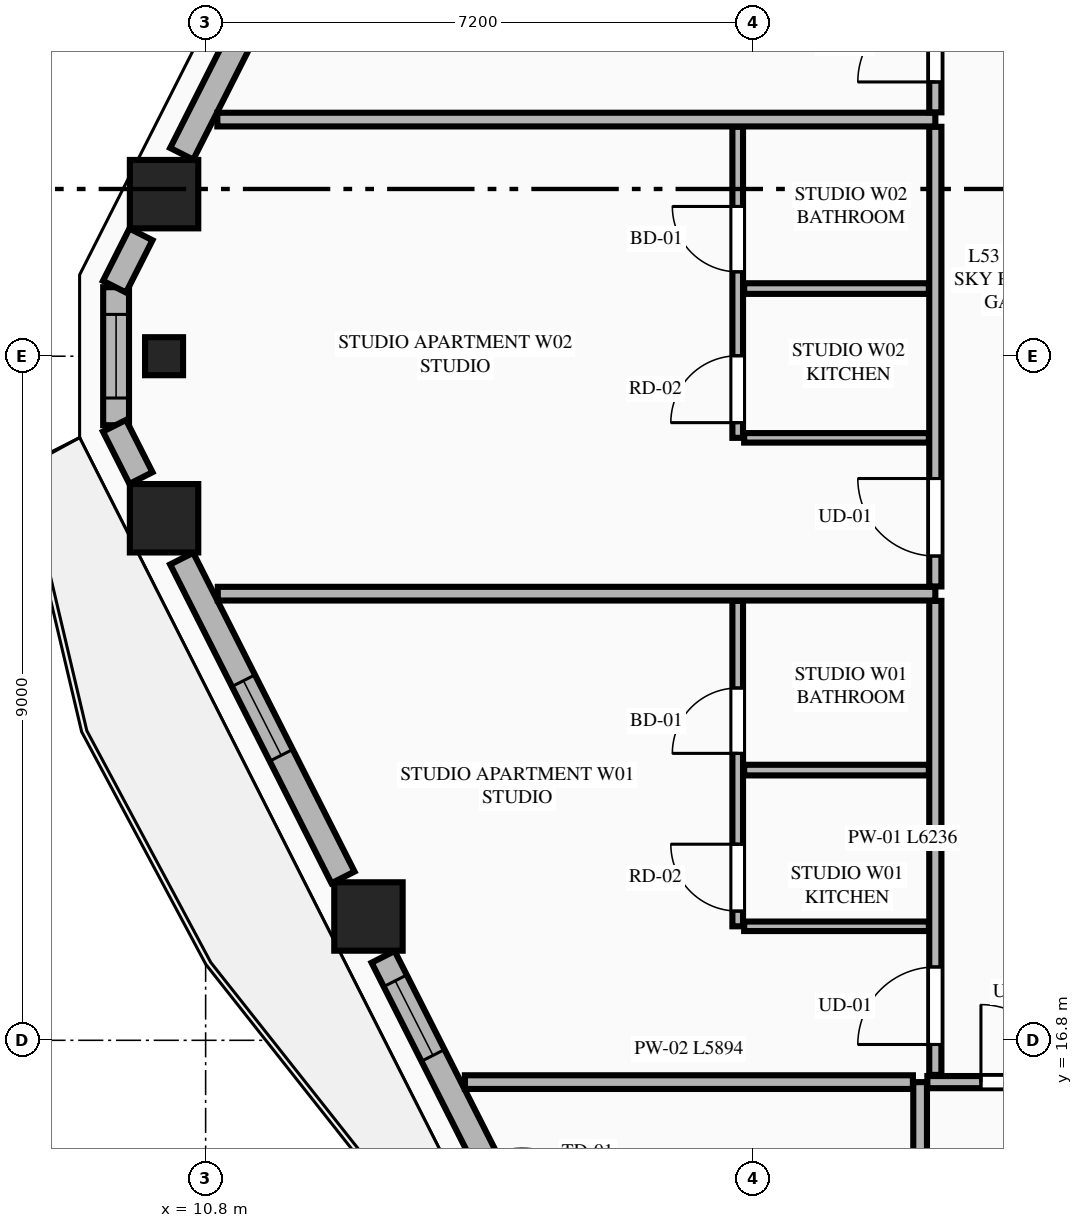
"""IFC4 building model, lengths in metres.
Left out: names, types, materials, properties, quantities, classifications, styles, units other than length and angle.
Written with IfcOpenShell. Run it as: python <this file> out.ifc"""

import sys

from ifc_helpers import new_model, si_unit, direction, frame, frame_2d, origin, origin_2d, place, context, subcontext, project, spatial, rectangle, extrude, element, fill, save


model = new_model("IFC4")
c1 = context("Model", 3, precision=1e-05, world=origin(), true_north=direction((0.0, 1.0)))
c2 = subcontext(c1, "Body", "Model", "MODEL_VIEW")
j1 = project(units=[si_unit("LENGTHUNIT", "METRE"), si_unit("PLANEANGLEUNIT", "RADIAN")], contexts=[c1])
p1 = place(None, origin())
s1 = spatial("IfcSite", under=j1, at=p1, CompositionType="ELEMENT")
p2 = place(p1, origin())
s2 = spatial("IfcBuilding", under=s1, at=p2, CompositionType="ELEMENT")
p3 = place(p2, frame((0.0, 0.0, 200.3)))
s3 = spatial("IfcBuildingStorey", under=s2, at=p3, CompositionType="ELEMENT", Elevation=200.3)
for number, where, z_axis, x_axis in (
    (1, (10.253, 27.932, 0.0), (0.0, 0.0, 1.0), (1.0, 0.0, 0.0)),
    (2, (10.253, 23.668, 0.0), (0.0, 0.0, 1.0), (1.0, 0.0, 0.0)),
    (3, (12.942, 18.429, 0.0), (0.0, 0.0, 1.0), (1.0, 0.0, 0.0)),
):
    element("IfcColumn", number, at=place(p3, frame(where, z_axis=z_axis, x_axis=x_axis)), inside=s3, PredefinedType="COLUMN", context=c2, shape_type="SweptSolid", body=[
        extrude(rectangle(XDim=0.9, YDim=0.9, at=origin_2d()), origin(), (0.0, 0.0, 1.0), 3.55),
    ])
p4 = place(p3, frame((10.253, 25.8, 0.0), z_axis=(0.0, 0.0, 1.0), x_axis=(0.0, -1.0, 0.0)))
e4 = element("IfcColumn", 4, at=p4, inside=s3, PredefinedType="PILASTER", context=c2, shape_type="SweptSolid", body=[
    extrude(rectangle(XDim=0.5, YDim=0.35, at=origin_2d()), origin(), (0.0, 0.0, 1.0), 3.55),
])
p5 = place(p3, frame((9.622, 26.708, 0.0), z_axis=(0.0, 0.0, 1.0), x_axis=(0.0, -1.0, 0.0)))
e5 = element("IfcWall", 5, at=p5, inside=s3, PredefinedType="STANDARD", context=c2, shape_type="SweptSolid", body=[
    extrude(rectangle(XDim=1.816, YDim=0.34, at=frame_2d((0.908, 0.0))), origin(), (0.0, 0.0, 1.0), 3.35),
])
p6 = place(p5, frame((0.358, 0.0, 0.75)))
e6 = element("IfcOpeningElement", 6, at=p6, cuts=e5, PredefinedType="OPENING", context=c2, shape_type="SweptSolid", body=[
    extrude(rectangle(XDim=1.1, YDim=2.0, at=frame_2d((0.55, 1.0))), frame((0.0, 0.18, 0.0), z_axis=(0.0, -1.0, 0.0), x_axis=(1.0, 0.0, 0.0)), (0.0, 0.0, 1.0), 0.36),
])
p7 = place(p3, frame((12.607, 32.657, 0.0), z_axis=(0.0, 0.0, 1.0), x_axis=(-0.451426298588, -0.892308409096, 0.0)))
e7 = element("IfcWall", 7, at=p7, inside=s3, PredefinedType="STANDARD", context=c2, shape_type="SweptSolid", body=[
    extrude(rectangle(XDim=4.7, YDim=0.34, at=frame_2d((2.35, 0.0))), origin(), (0.0, 0.0, 1.0), 2.883),
])
p8 = place(p7, frame((1.8, 0.0, 0.75)))
e8 = element("IfcOpeningElement", 8, at=p8, cuts=e7, PredefinedType="OPENING", context=c2, shape_type="SweptSolid", body=[
    extrude(rectangle(XDim=1.1, YDim=1.983, at=frame_2d((0.55, 0.991))), frame((0.0, 0.18, 0.0), z_axis=(0.0, -1.0, 0.0), x_axis=(1.0, 0.0, 0.0)), (0.0, 0.0, 1.0), 0.36),
])
for number, where, z_axis, x_axis in (
    (9, (9.949, 27.403, 0.0), (0.0, 0.0, 1.0), (-0.451, -0.892, 0.0)),
    (10, (9.601, 24.885, 0.0), (0.0, 0.0, 1.0), (0.451, -0.892, 0.0)),
):
    element("IfcWall", number, at=place(p3, frame(where, z_axis=z_axis, x_axis=x_axis)), inside=s3, PredefinedType="STANDARD", context=c2, shape_type="SweptSolid", body=[
        extrude(rectangle(XDim=0.771, YDim=0.34, at=frame_2d((0.385, 0.0))), origin(), (0.0, 0.0, 1.0), 3.35),
    ])
p9 = place(p3, frame((10.485, 23.137, 0.0), z_axis=(0.0, 0.0, 1.0), x_axis=(0.451447222193, -0.892297823361, 0.0)))
e11 = element("IfcWall", 11, at=p9, inside=s3, PredefinedType="STANDARD", context=c2, shape_type="SweptSolid", body=[
    extrude(rectangle(XDim=4.7, YDim=0.34, at=frame_2d((2.35, 0.0))), origin(), (0.0, 0.0, 1.0), 2.883),
])
p10 = place(p9, frame((1.8, 0.0, 0.75)))
e12 = element("IfcOpeningElement", 12, at=p10, cuts=e11, PredefinedType="OPENING", context=c2, shape_type="SweptSolid", body=[
    extrude(rectangle(XDim=1.1, YDim=1.983, at=frame_2d((0.55, 0.991))), frame((0.0, 0.18, 0.0), z_axis=(0.0, -1.0, 0.0), x_axis=(1.0, 0.0, 0.0)), (0.0, 0.0, 1.0), 0.36),
])
p11 = place(p3, frame((13.135, 17.898, 0.0), z_axis=(0.0, 0.0, 1.0), x_axis=(0.451544279509, -0.892248711763, 0.0)))
e13 = element("IfcWall", 13, at=p11, inside=s3, PredefinedType="STANDARD", context=c2, shape_type="SweptSolid", body=[
    extrude(rectangle(XDim=4.91, YDim=0.34, at=frame_2d((2.455, 0.0))), origin(), (0.0, 0.0, 1.0), 2.883),
])
p12 = place(p11, frame((2.954, 0.0, 0.0)))
e14 = element("IfcOpeningElement", 14, at=p12, cuts=e13, PredefinedType="OPENING", context=c2, shape_type="SweptSolid", body=[
    extrude(rectangle(XDim=1.1, YDim=2.25, at=frame_2d((0.55, 1.125))), frame((0.0, 0.18, 0.0), z_axis=(0.0, -1.0, 0.0), x_axis=(1.0, 0.0, 0.0)), (0.0, 0.0, 1.0), 0.36),
])
p13 = place(p11, frame((0.353, 0.0, 0.75)))
e15 = element("IfcOpeningElement", 15, at=p13, cuts=e13, PredefinedType="OPENING", context=c2, shape_type="SweptSolid", body=[
    extrude(rectangle(XDim=1.1, YDim=1.983, at=frame_2d((0.55, 0.991))), frame((0.0, 0.18, 0.0), z_axis=(0.0, -1.0, 0.0), x_axis=(1.0, 0.0, 0.0)), (0.0, 0.0, 1.0), 0.36),
])
p14 = place(p3, frame((20.2, 5.968, 0.0), z_axis=(0.0, 0.0, 1.0), x_axis=(0.0, 1.0, 0.0)))
e16 = element("IfcWall", 16, at=p14, inside=s3, PredefinedType="PARTITIONING", context=c2, shape_type="SweptSolid", body=[
    extrude(rectangle(XDim=10.282, YDim=0.18, at=frame_2d((5.141, 0.0))), origin(), (0.0, 0.0, 1.0), 3.35),
])
p15 = place(p3, frame((20.295, 16.25, 0.0), z_axis=(0.0, 0.0, 1.0), x_axis=(1.0, 0.0, 0.0)))
e17 = element("IfcWall", 17, at=p15, inside=s3, PredefinedType="PARTITIONING", context=c2, shape_type="SweptSolid", body=[
    extrude(rectangle(XDim=8.467, YDim=0.16, at=frame_2d((4.233, 0.0))), origin(), (0.0, 0.0, 1.0), 3.35),
])
p16 = place(p15, frame((0.705, 0.0, 0.0)))
e18 = element("IfcOpeningElement", 18, at=p16, cuts=e17, PredefinedType="OPENING", context=c2, shape_type="SweptSolid", body=[
    extrude(rectangle(XDim=1.02, YDim=2.25, at=frame_2d((0.51, 1.125))), frame((0.0, 0.09, 0.0), z_axis=(0.0, -1.0, 0.0), x_axis=(1.0, 0.0, 0.0)), (0.0, 0.0, 1.0), 0.18),
])
p17 = place(p3, frame((14.211, 16.25, 0.0), z_axis=(0.0, 0.0, 1.0), x_axis=(1.0, 0.0, 0.0)))
e19 = element("IfcWall", 19, at=p17, inside=s3, PredefinedType="PARTITIONING", context=c2, shape_type="SweptSolid", body=[
    extrude(rectangle(XDim=5.894, YDim=0.18, at=frame_2d((2.947, 0.0))), origin(), (0.0, 0.0, 1.0), 3.35),
])
p18 = place(p3, frame((20.4, 16.345, 0.0), z_axis=(0.0, 0.0, 1.0), x_axis=(0.0, 1.0, 0.0)))
e20 = element("IfcWall", 20, at=p18, inside=s3, PredefinedType="PARTITIONING", context=c2, shape_type="SweptSolid", body=[
    extrude(rectangle(XDim=6.236, YDim=0.16, at=frame_2d((3.118, 0.0))), origin(), (0.0, 0.0, 1.0), 3.35),
])
p19 = place(p18, frame((0.4, 0.0, 0.0)))
e21 = element("IfcOpeningElement", 21, at=p19, cuts=e20, PredefinedType="OPENING", context=c2, shape_type="SweptSolid", body=[
    extrude(rectangle(XDim=1.02, YDim=2.25, at=frame_2d((0.51, 1.125))), frame((0.0, 0.09, 0.0), z_axis=(0.0, -1.0, 0.0), x_axis=(1.0, 0.0, 0.0)), (0.0, 0.0, 1.0), 0.18),
])
p20 = place(p3, frame((17.885, 18.3, 0.0), z_axis=(0.0, 0.0, 1.0), x_axis=(1.0, 0.0, 0.0)))
e22 = element("IfcWall", 22, at=p20, inside=s3, PredefinedType="PARTITIONING", context=c2, shape_type="SweptSolid", body=[
    extrude(rectangle(XDim=2.43, YDim=0.125, at=frame_2d((1.215, 0.0))), origin(), (0.0, 0.0, 1.0), 2.807),
])
p21 = place(p3, frame((17.8, 18.3, 0.0), z_axis=(0.0, 0.0, 1.0), x_axis=(0.0, 1.0, 0.0)))
e23 = element("IfcWall", 23, at=p21, inside=s3, PredefinedType="PLUMBINGWALL", context=c2, shape_type="SweptSolid", body=[
    extrude(rectangle(XDim=4.281, YDim=0.14, at=frame_2d((2.141, 0.0))), origin(), (0.0, 0.0, 1.0), 3.35),
])
p22 = place(p21, frame((2.275, 0.0, 0.0)))
e24 = element("IfcOpeningElement", 24, at=p22, cuts=e23, PredefinedType="OPENING", context=c2, shape_type="SweptSolid", body=[
    extrude(rectangle(XDim=0.86, YDim=2.1, at=frame_2d((0.43, 1.05))), frame((0.0, 0.08, 0.0), z_axis=(0.0, -1.0, 0.0), x_axis=(1.0, 0.0, 0.0)), (0.0, 0.0, 1.0), 0.16),
])
p23 = place(p21, frame((0.2, 0.0, 0.0)))
e25 = element("IfcOpeningElement", 25, at=p23, cuts=e23, PredefinedType="OPENING", context=c2, shape_type="SweptSolid", body=[
    extrude(rectangle(XDim=0.88, YDim=2.15, at=frame_2d((0.44, 1.075))), frame((0.0, 0.08, 0.0), z_axis=(0.0, -1.0, 0.0), x_axis=(1.0, 0.0, 0.0)), (0.0, 0.0, 1.0), 0.16),
])
p24 = place(p3, frame((17.885, 20.355, 0.0), z_axis=(0.0, 0.0, 1.0), x_axis=(1.0, 0.0, 0.0)))
e26 = element("IfcWall", 26, at=p24, inside=s3, PredefinedType="PLUMBINGWALL", context=c2, shape_type="SweptSolid", body=[
    extrude(rectangle(XDim=2.43, YDim=0.14, at=frame_2d((1.215, 0.0))), origin(), (0.0, 0.0, 1.0), 3.35),
])
p25 = place(p3, frame((10.96, 22.676, 0.0), z_axis=(0.0, 0.0, 1.0), x_axis=(1.0, 0.0, 0.0)))
e27 = element("IfcWall", 27, at=p25, inside=s3, PredefinedType="PARTITIONING", context=c2, shape_type="SweptSolid", body=[
    extrude(rectangle(XDim=9.44, YDim=0.18, at=frame_2d((4.72, 0.0))), origin(), (0.0, 0.0, 1.0), 3.35),
])
p26 = place(p3, frame((20.4, 22.771, 0.0), z_axis=(0.0, 0.0, 1.0), x_axis=(0.0, 1.0, 0.0)))
e28 = element("IfcWall", 28, at=p26, inside=s3, PredefinedType="PARTITIONING", context=c2, shape_type="SweptSolid", body=[
    extrude(rectangle(XDim=6.047, YDim=0.16, at=frame_2d((3.023, 0.0))), origin(), (0.0, 0.0, 1.0), 3.35),
])
p27 = place(p26, frame((0.4, 0.0, 0.0)))
e29 = element("IfcOpeningElement", 29, at=p27, cuts=e28, PredefinedType="OPENING", context=c2, shape_type="SweptSolid", body=[
    extrude(rectangle(XDim=1.02, YDim=2.25, at=frame_2d((0.51, 1.125))), frame((0.0, 0.09, 0.0), z_axis=(0.0, -1.0, 0.0), x_axis=(1.0, 0.0, 0.0)), (0.0, 0.0, 1.0), 0.18),
])
p28 = place(p3, frame((17.885, 24.726, 0.0), z_axis=(0.0, 0.0, 1.0), x_axis=(1.0, 0.0, 0.0)))
e30 = element("IfcWall", 30, at=p28, inside=s3, PredefinedType="PARTITIONING", context=c2, shape_type="SweptSolid", body=[
    extrude(rectangle(XDim=2.43, YDim=0.125, at=frame_2d((1.215, 0.0))), origin(), (0.0, 0.0, 1.0), 3.35),
])
p29 = place(p3, frame((17.8, 24.726, 0.0), z_axis=(0.0, 0.0, 1.0), x_axis=(0.0, 1.0, 0.0)))
e31 = element("IfcWall", 31, at=p29, inside=s3, PredefinedType="PLUMBINGWALL", context=c2, shape_type="SweptSolid", body=[
    extrude(rectangle(XDim=4.092, YDim=0.14, at=frame_2d((2.046, 0.0))), origin(), (0.0, 0.0, 1.0), 3.35),
])
p30 = place(p29, frame((2.184, 0.0, 0.0)))
e32 = element("IfcOpeningElement", 32, at=p30, cuts=e31, PredefinedType="OPENING", context=c2, shape_type="SweptSolid", body=[
    extrude(rectangle(XDim=0.86, YDim=2.1, at=frame_2d((0.43, 1.05))), frame((0.0, 0.08, 0.0), z_axis=(0.0, -1.0, 0.0), x_axis=(1.0, 0.0, 0.0)), (0.0, 0.0, 1.0), 0.16),
])
p31 = place(p29, frame((0.2, 0.0, 0.0)))
e33 = element("IfcOpeningElement", 33, at=p31, cuts=e31, PredefinedType="OPENING", context=c2, shape_type="SweptSolid", body=[
    extrude(rectangle(XDim=0.88, YDim=2.15, at=frame_2d((0.44, 1.075))), frame((0.0, 0.08, 0.0), z_axis=(0.0, -1.0, 0.0), x_axis=(1.0, 0.0, 0.0)), (0.0, 0.0, 1.0), 0.16),
])
p32 = place(p3, frame((17.885, 26.69, 0.0), z_axis=(0.0, 0.0, 1.0), x_axis=(1.0, 0.0, 0.0)))
e34 = element("IfcWall", 34, at=p32, inside=s3, PredefinedType="PLUMBINGWALL", context=c2, shape_type="SweptSolid", body=[
    extrude(rectangle(XDim=2.43, YDim=0.14, at=frame_2d((1.215, 0.0))), origin(), (0.0, 0.0, 1.0), 3.35),
])
p33 = place(p3, frame((10.954, 28.913, 0.0), z_axis=(0.0, 0.0, 1.0), x_axis=(1.0, 0.0, 0.0)))
e35 = element("IfcWall", 35, at=p33, inside=s3, PredefinedType="PARTITIONING", context=c2, shape_type="SweptSolid", body=[
    extrude(rectangle(XDim=9.446, YDim=0.18, at=frame_2d((4.723, 0.0))), origin(), (0.0, 0.0, 1.0), 3.35),
])
p34 = place(p3, frame((20.4, 29.008, 0.0), z_axis=(0.0, 0.0, 1.0), x_axis=(0.0, 1.0, 0.0)))
e36 = element("IfcWall", 36, at=p34, inside=s3, PredefinedType="PARTITIONING", context=c2, shape_type="SweptSolid", body=[
    extrude(rectangle(XDim=6.047, YDim=0.16, at=frame_2d((3.023, 0.0))), origin(), (0.0, 0.0, 1.0), 3.35),
])
p35 = place(p34, frame((0.4, 0.0, 0.0)))
e37 = element("IfcOpeningElement", 37, at=p35, cuts=e36, PredefinedType="OPENING", context=c2, shape_type="SweptSolid", body=[
    extrude(rectangle(XDim=1.02, YDim=2.25, at=frame_2d((0.51, 1.125))), frame((0.0, 0.09, 0.0), z_axis=(0.0, -1.0, 0.0), x_axis=(1.0, 0.0, 0.0)), (0.0, 0.0, 1.0), 0.18),
])
p36 = place(p10, origin())
e38 = element("IfcWindow", 38, at=p36, inside=s3, PartitioningType="SINGLE_PANEL", PredefinedType="WINDOW", context=c2, shape_type="SweptSolid", body=[
    extrude(rectangle(XDim=1.1, YDim=1.983, at=frame_2d((0.55, 0.991))), frame((0.0, 0.03, 0.0), z_axis=(0.0, -1.0, 0.0), x_axis=(1.0, 0.0, 0.0)), (0.0, 0.0, 1.0), 0.06),
])
fill(e12, e38)
p37 = place(p16, origin())
e39 = element("IfcDoor", 39, at=p37, inside=s3, OperationType="SINGLE_SWING_LEFT", PredefinedType="DOOR", context=c2, shape_type="SweptSolid", body=[
    extrude(rectangle(XDim=1.02, YDim=2.25, at=frame_2d((0.51, 1.125))), frame((0.0, 0.025, 0.0), z_axis=(0.0, -1.0, 0.0), x_axis=(1.0, 0.0, 0.0)), (0.0, 0.0, 1.0), 0.05),
])
fill(e18, e39)
p38 = place(p22, origin())
e40 = element("IfcDoor", 40, at=p38, inside=s3, OperationType="SINGLE_SWING_LEFT", PredefinedType="DOOR", context=c2, shape_type="SweptSolid", body=[
    extrude(rectangle(XDim=0.86, YDim=2.1, at=frame_2d((0.43, 1.05))), frame((0.0, 0.025, 0.0), z_axis=(0.0, -1.0, 0.0), x_axis=(1.0, 0.0, 0.0)), (0.0, 0.0, 1.0), 0.05),
])
fill(e24, e40)
p39 = place(p19, origin())
e41 = element("IfcDoor", 41, at=p39, inside=s3, OperationType="SINGLE_SWING_LEFT", PredefinedType="DOOR", context=c2, shape_type="SweptSolid", body=[
    extrude(rectangle(XDim=1.02, YDim=2.25, at=frame_2d((0.51, 1.125))), frame((0.0, 0.025, 0.0), z_axis=(0.0, -1.0, 0.0), x_axis=(1.0, 0.0, 0.0)), (0.0, 0.0, 1.0), 0.05),
])
fill(e21, e41)
p40 = place(p23, origin())
e42 = element("IfcDoor", 42, at=p40, inside=s3, OperationType="SINGLE_SWING_RIGHT", PredefinedType="DOOR", context=c2, shape_type="SweptSolid", body=[
    extrude(rectangle(XDim=0.88, YDim=2.15, at=frame_2d((0.44, 1.075))), frame((0.0, 0.025, 0.0), z_axis=(0.0, -1.0, 0.0), x_axis=(1.0, 0.0, 0.0)), (0.0, 0.0, 1.0), 0.05),
])
fill(e25, e42)
p41 = place(p30, origin())
e43 = element("IfcDoor", 43, at=p41, inside=s3, OperationType="SINGLE_SWING_RIGHT", PredefinedType="DOOR", context=c2, shape_type="SweptSolid", body=[
    extrude(rectangle(XDim=0.86, YDim=2.1, at=frame_2d((0.43, 1.05))), frame((0.0, 0.025, 0.0), z_axis=(0.0, -1.0, 0.0), x_axis=(1.0, 0.0, 0.0)), (0.0, 0.0, 1.0), 0.05),
])
fill(e32, e43)
p42 = place(p27, origin())
e44 = element("IfcDoor", 44, at=p42, inside=s3, OperationType="SINGLE_SWING_RIGHT", PredefinedType="DOOR", context=c2, shape_type="SweptSolid", body=[
    extrude(rectangle(XDim=1.02, YDim=2.25, at=frame_2d((0.51, 1.125))), frame((0.0, 0.025, 0.0), z_axis=(0.0, -1.0, 0.0), x_axis=(1.0, 0.0, 0.0)), (0.0, 0.0, 1.0), 0.05),
])
fill(e29, e44)
p43 = place(p31, origin())
e45 = element("IfcDoor", 45, at=p43, inside=s3, OperationType="SINGLE_SWING_LEFT", PredefinedType="DOOR", context=c2, shape_type="SweptSolid", body=[
    extrude(rectangle(XDim=0.88, YDim=2.15, at=frame_2d((0.44, 1.075))), frame((0.0, 0.025, 0.0), z_axis=(0.0, -1.0, 0.0), x_axis=(1.0, 0.0, 0.0)), (0.0, 0.0, 1.0), 0.05),
])
fill(e33, e45)
p44 = place(p35, origin())
e46 = element("IfcDoor", 46, at=p44, inside=s3, OperationType="SINGLE_SWING_LEFT", PredefinedType="DOOR", context=c2, shape_type="SweptSolid", body=[
    extrude(rectangle(XDim=1.02, YDim=2.25, at=frame_2d((0.51, 1.125))), frame((0.0, 0.025, 0.0), z_axis=(0.0, -1.0, 0.0), x_axis=(1.0, 0.0, 0.0)), (0.0, 0.0, 1.0), 0.05),
])
fill(e37, e46)
p45 = place(p13, origin())
e47 = element("IfcWindow", 47, at=p45, inside=s3, PartitioningType="SINGLE_PANEL", PredefinedType="WINDOW", context=c2, shape_type="SweptSolid", body=[
    extrude(rectangle(XDim=1.1, YDim=1.983, at=frame_2d((0.55, 0.991))), frame((0.0, 0.03, 0.0), z_axis=(0.0, -1.0, 0.0), x_axis=(1.0, 0.0, 0.0)), (0.0, 0.0, 1.0), 0.06),
])
fill(e15, e47)
p46 = place(p6, origin())
e48 = element("IfcWindow", 48, at=p46, inside=s3, PartitioningType="SINGLE_PANEL", PredefinedType="WINDOW", context=c2, shape_type="SweptSolid", body=[
    extrude(rectangle(XDim=1.1, YDim=2.0, at=frame_2d((0.55, 1.0))), frame((0.0, 0.03, 0.0), z_axis=(0.0, -1.0, 0.0), x_axis=(1.0, 0.0, 0.0)), (0.0, 0.0, 1.0), 0.06),
])
fill(e6, e48)
save(model, sys.argv[1])
